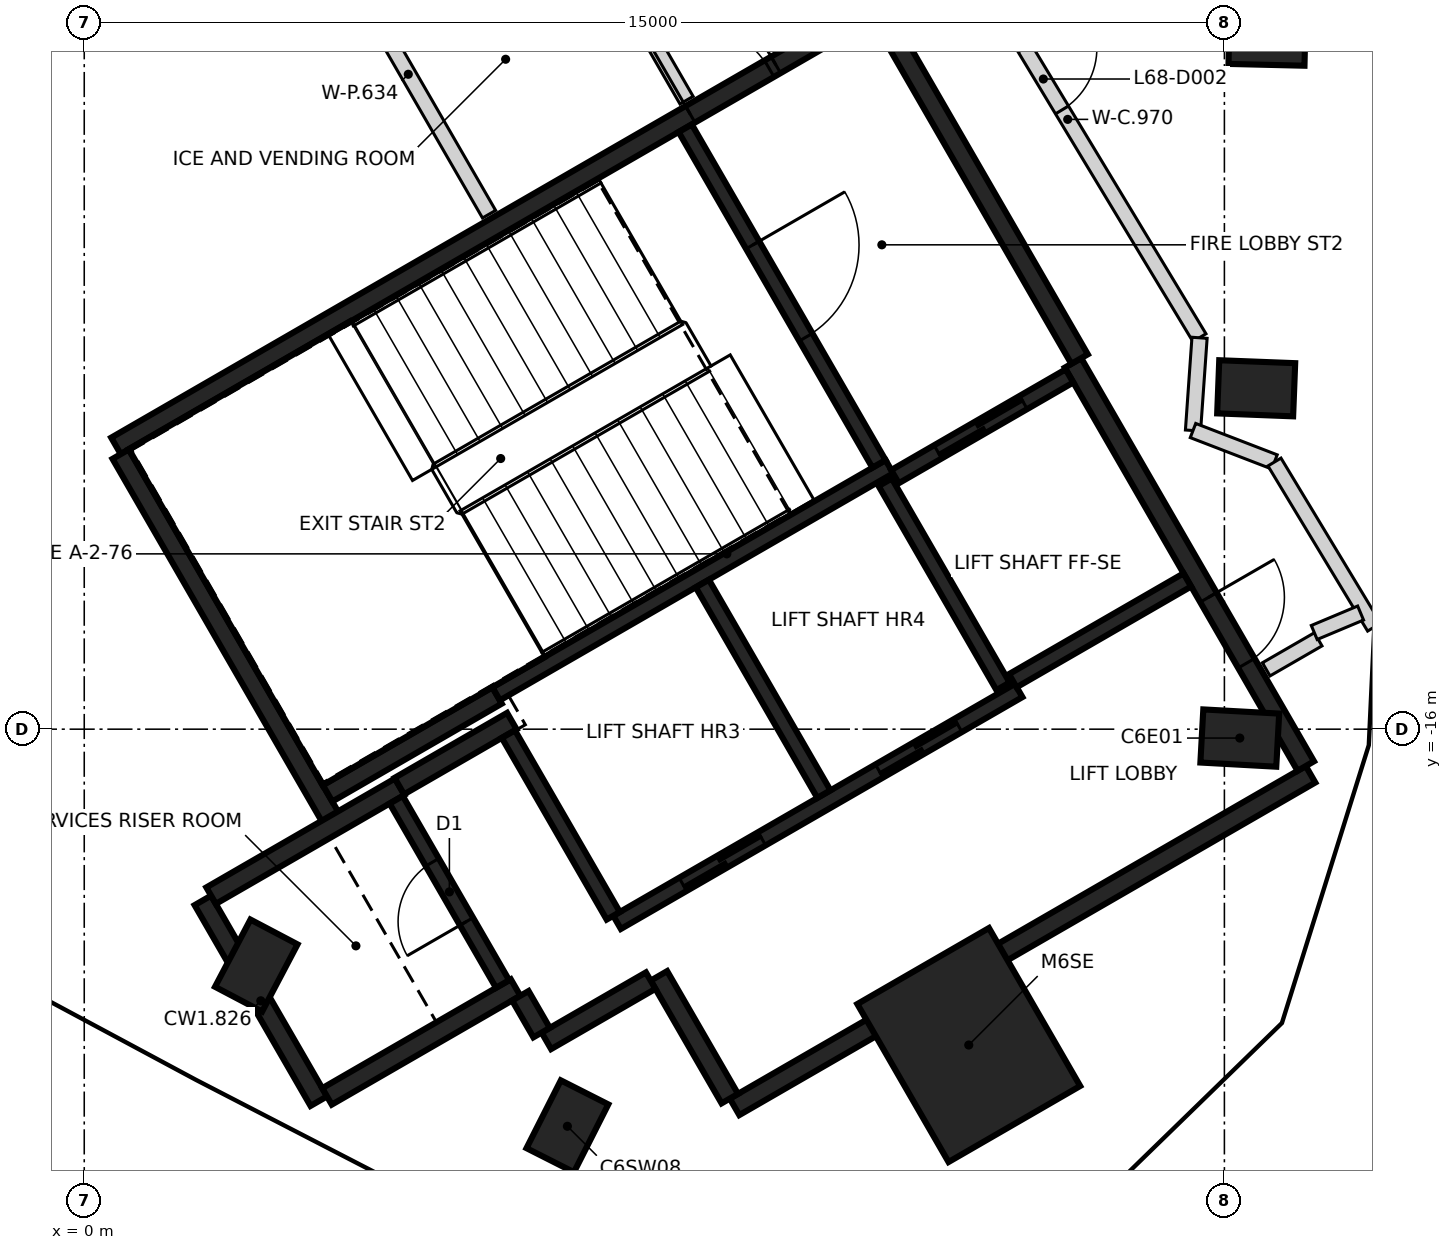
"""IFC4 building model, lengths in metres.
Left out: names, types, materials, properties, quantities, classifications, styles, units other than length and angle.
Written with IfcOpenShell. Run it as: python <this file> out.ifc"""

import sys

from ifc_helpers import new_model, si_unit, direction, frame, frame_2d, origin, origin_2d, place, context, subcontext, project, spatial, rectangle, extrude, element, fill, save


model = new_model("IFC4")
c1 = context("Model", 3, precision=1e-05, world=origin(), true_north=direction((0.0, 1.0)))
c2 = subcontext(c1, "Body", "Model", "MODEL_VIEW")
j1 = project(units=[si_unit("LENGTHUNIT", "METRE"), si_unit("PLANEANGLEUNIT", "RADIAN")], contexts=[c1])
p1 = place(None, origin())
s1 = spatial("IfcSite", under=j1, at=p1, CompositionType="ELEMENT")
p2 = place(p1, origin())
s2 = spatial("IfcBuilding", under=s1, at=p2, CompositionType="ELEMENT")
p3 = place(p2, frame((0.0, 0.0, 269.4)))
s3 = spatial("IfcBuildingStorey", under=s2, at=p3, CompositionType="ELEMENT", Elevation=269.4)
for number, where, z_axis, x_axis in (
    (1, (15.202, -16.117, -0.35), (0.0, 0.0, 1.0), (-0.998, 0.055, 0.0)),
    (2, (15.418, -11.515, -0.35), (0.0, 0.0, 1.0), (-0.999, 0.039, 0.0)),
    (3, (15.562, -6.91, -0.35), (0.0, 0.0, 1.0), (-1.0, 0.024, 0.0)),
    (4, (2.263, -19.11, -0.35), (0.0, 0.0, 1.0), (0.466, 0.885, 0.0)),
    (5, (6.356, -21.224, -0.35), (0.0, 0.0, 1.0), (0.452, 0.892, 0.0)),
):
    element("IfcColumn", number, at=place(p3, frame(where, z_axis=z_axis, x_axis=x_axis)), inside=s3, PredefinedType="COLUMN", context=c2, shape_type="SweptSolid", body=[
        extrude(rectangle(XDim=1.0, YDim=0.7, at=origin_2d()), origin(), (0.0, 0.0, 1.0), 3.6),
    ])
p4 = place(p3, frame((11.637, -20.155, -0.35), z_axis=(0.0, 0.0, 1.0), x_axis=(-0.5, 0.866025403784, 0.0)))
e6 = element("IfcColumn", 6, at=p4, inside=s3, PredefinedType="COLUMN", context=c2, shape_type="SweptSolid", body=[
    extrude(rectangle(XDim=2.4, YDim=2.0, at=origin_2d()), origin(), (0.0, 0.0, 1.0), 3.6),
])
p5 = place(p3, frame((0.417, -12.273, 0.0), z_axis=(0.0, 0.0, 1.0), x_axis=(0.866021906294, 0.500006057782, 0.0)))
e7 = element("IfcWall", 7, at=p5, inside=s3, PredefinedType="SHEAR", context=c2, shape_type="SweptSolid", body=[
    extrude(rectangle(XDim=11.55, YDim=0.25, at=frame_2d((5.775, 0.0))), origin(), (0.0, 0.0, 1.0), 3.25),
])
p6 = place(p5, frame((10.025, 0.0, 0.0)))
e8 = element("IfcOpeningElement", 8, at=p6, cuts=e7, PredefinedType="OPENING", context=c2, shape_type="SweptSolid", body=[
    extrude(rectangle(XDim=1.2, YDim=2.1, at=frame_2d((0.6, 1.05))), frame((0.0, 0.135, 0.0), z_axis=(0.0, -1.0, 0.0), x_axis=(1.0, 0.0, 0.0)), (0.0, 0.0, 1.0), 0.27),
])
p7 = place(p5, frame((8.725, 0.0, 0.0)))
e9 = element("IfcOpeningElement", 9, at=p7, cuts=e7, PredefinedType="OPENING", context=c2, shape_type="SweptSolid", body=[
    extrude(rectangle(XDim=1.2, YDim=2.1, at=frame_2d((0.6, 1.05))), frame((0.0, 0.135, 0.0), z_axis=(0.0, -1.0, 0.0), x_axis=(1.0, 0.0, 0.0)), (0.0, 0.0, 1.0), 0.27),
])
p8 = place(p3, frame((16.133, -16.594, 0.0), z_axis=(0.0, 0.0, 1.0), x_axis=(-0.866022959057, -0.500004234368, 0.0)))
e10 = element("IfcWall", 10, at=p8, inside=s3, PredefinedType="SHEAR", context=c2, shape_type="SweptSolid", body=[
    extrude(rectangle(XDim=8.75, YDim=0.25, at=frame_2d((4.375, 0.0))), origin(), (0.0, 0.0, 1.0), 3.25),
])
p9 = place(p3, frame((13.008, -11.181, 0.0), z_axis=(0.0, 0.0, 1.0), x_axis=(0.500001955336, -0.866024274868, 0.0)))
e11 = element("IfcWall", 11, at=p9, inside=s3, PredefinedType="SHEAR", context=c2, shape_type="SweptSolid", body=[
    extrude(rectangle(XDim=6.125, YDim=0.25, at=frame_2d((3.062, 0.0))), origin(), (0.0, 0.0, 1.0), 3.25),
])
p10 = place(p9, frame((3.563, 0.0, 0.0)))
e12 = element("IfcOpeningElement", 12, at=p10, cuts=e11, PredefinedType="OPENING", context=c2, shape_type="SweptSolid", body=[
    extrude(rectangle(XDim=1.0, YDim=2.1, at=frame_2d((0.5, 1.05))), frame((0.0, 0.135, 0.0), z_axis=(0.0, -1.0, 0.0), x_axis=(1.0, 0.0, 0.0)), (0.0, 0.0, 1.0), 0.27),
])
p11 = place(p3, frame((3.235, -17.153, 0.0), z_axis=(0.0, 0.0, 1.0), x_axis=(-0.500008851346, 0.866020293397, 0.0)))
e13 = element("IfcWall", 13, at=p11, inside=s3, PredefinedType="SHEAR", context=c2, shape_type="SweptSolid", body=[
    extrude(rectangle(XDim=5.51, YDim=0.25, at=frame_2d((2.755, 0.0))), origin(), (0.0, 0.0, 1.0), 3.25),
])
p12 = place(p3, frame((10.483, -6.606, 0.0), z_axis=(0.0, 0.0, 1.0), x_axis=(0.49999885962, -0.866026062182, 0.0)))
e14 = element("IfcWall", 14, at=p12, inside=s3, PredefinedType="SHEAR", context=c2, shape_type="SweptSolid", body=[
    extrude(rectangle(XDim=5.225, YDim=0.25, at=frame_2d((2.612, 0.0))), origin(), (0.0, 0.0, 1.0), 3.25),
])
p13 = place(p3, frame((3.085, -20.894, 0.0), z_axis=(0.0, 0.0, 1.0), x_axis=(-0.499978833458, 0.866037623948, 0.0)))
e15 = element("IfcWall", 15, at=p13, inside=s3, PredefinedType="SHEAR", context=c2, shape_type="SweptSolid", body=[
    extrude(rectangle(XDim=3.05, YDim=0.25, at=frame_2d((1.525, 0.0))), origin(), (0.0, 0.0, 1.0), 3.25),
])
p14 = place(p3, frame((1.669, -18.19, 0.0), z_axis=(0.0, 0.0, 1.0), x_axis=(0.866042235819, 0.499970844928, 0.0)))
e16 = element("IfcWall", 16, at=p14, inside=s3, PredefinedType="SHEAR", context=c2, shape_type="SweptSolid", body=[
    extrude(rectangle(XDim=2.865, YDim=0.25, at=frame_2d((1.432, 0.0))), origin(), (0.0, 0.0, 1.0), 3.25),
])
p15 = place(p3, frame((5.675, -19.399, 0.0), z_axis=(0.0, 0.0, 1.0), x_axis=(-0.866026637627, -0.499997862916, 0.0)))
e17 = element("IfcWall", 17, at=p15, inside=s3, PredefinedType="SHEAR", context=c2, shape_type="SweptSolid", body=[
    extrude(rectangle(XDim=2.865, YDim=0.25, at=frame_2d((1.432, 0.0))), origin(), (0.0, 0.0, 1.0), 3.25),
])
p16 = place(p3, frame((5.431, -15.556, 0.0), z_axis=(0.0, 0.0, 1.0), x_axis=(-0.866022940537, -0.500004266446, 0.0)))
e18 = element("IfcWall", 18, at=p16, inside=s3, PredefinedType="SHEAR", context=c2, shape_type="SweptSolid", body=[
    extrude(rectangle(XDim=2.575, YDim=0.25, at=frame_2d((1.287, 0.0))), origin(), (0.0, 0.0, 1.0), 3.25),
])
p17 = place(p3, frame((8.493, -20.86, 0.0), z_axis=(0.0, 0.0, 1.0), x_axis=(-0.500039802285, 0.866002422705, 0.0)))
e19 = element("IfcWall", 19, at=p17, inside=s3, PredefinedType="SHEAR", context=c2, shape_type="SweptSolid", body=[
    extrude(rectangle(XDim=1.865, YDim=0.25, at=frame_2d((0.932, 0.0))), origin(), (0.0, 0.0, 1.0), 3.25),
])
p18 = place(p3, frame((4.145, -16.749, 0.0), z_axis=(0.0, 0.0, 1.0), x_axis=(0.866038183914, 0.499977863513, 0.0)))
e20 = element("IfcWall", 20, at=p18, inside=s3, PredefinedType="SHEAR", context=c2, shape_type="SweptSolid", body=[
    extrude(rectangle(XDim=1.71, YDim=0.25, at=frame_2d((0.855, 0.0))), origin(), (0.0, 0.0, 1.0), 3.25),
])
p19 = place(p3, frame((7.452, -19.308, 0.0), z_axis=(0.0, 0.0, 1.0), x_axis=(-0.866044474677, -0.49996696679, 0.0)))
e21 = element("IfcWall", 21, at=p19, inside=s3, PredefinedType="SHEAR", context=c2, shape_type="SweptSolid", body=[
    extrude(rectangle(XDim=1.584, YDim=0.25, at=frame_2d((0.792, 0.0))), origin(), (0.0, 0.0, 1.0), 3.25),
])
p20 = place(p3, frame((6.017, -19.992, 0.0), z_axis=(0.0, 0.0, 1.0), x_axis=(-0.500364886717, 0.865814633822, 0.0)))
e22 = element("IfcWall", 22, at=p20, inside=s3, PredefinedType="SHEAR", context=c2, shape_type="SweptSolid", body=[
    extrude(rectangle(XDim=0.559, YDim=0.25, at=frame_2d((0.28, 0.0))), origin(), (0.0, 0.0, 1.0), 3.25),
])
p21 = place(p3, frame((5.419, -15.534, 0.0), z_axis=(0.0, 0.0, 1.0), x_axis=(0.866029065029, 0.499993658486, 0.0)))
e23 = element("IfcWall", 23, at=p21, inside=s3, PredefinedType="SHEAR", context=c2, shape_type="SweptSolid", body=[
    extrude(rectangle(XDim=5.974, YDim=0.2, at=frame_2d((2.987, 0.0))), origin(), (0.0, 0.0, 1.0), 3.25),
])
p22 = place(p3, frame((7.01, -18.542, 0.0), z_axis=(0.0, 0.0, 1.0), x_axis=(0.866030299012, 0.499991521122, 0.0)))
e24 = element("IfcWall", 24, at=p22, inside=s3, PredefinedType="SHEAR", context=c2, shape_type="SweptSolid", body=[
    extrude(rectangle(XDim=6.1, YDim=0.2, at=frame_2d((3.05, 0.0))), origin(), (0.0, 0.0, 1.0), 3.25),
])
p23 = place(p22, frame((1.0, 0.0, 0.0)))
e25 = element("IfcOpeningElement", 25, at=p23, cuts=e24, PredefinedType="OPENING", context=c2, shape_type="SweptSolid", body=[
    extrude(rectangle(XDim=1.2, YDim=2.1, at=frame_2d((0.6, 1.05))), frame((0.0, 0.11, 0.0), z_axis=(0.0, -1.0, 0.0), x_axis=(1.0, 0.0, 0.0)), (0.0, 0.0, 1.0), 0.22),
])
p24 = place(p22, frame((3.982, 0.0, 0.0)))
e26 = element("IfcOpeningElement", 26, at=p24, cuts=e24, PredefinedType="OPENING", context=c2, shape_type="SweptSolid", body=[
    extrude(rectangle(XDim=1.2, YDim=2.1, at=frame_2d((0.6, 1.05))), frame((0.0, 0.11, 0.0), z_axis=(0.0, -1.0, 0.0), x_axis=(1.0, 0.0, 0.0)), (0.0, 0.0, 1.0), 0.22),
])
p25 = place(p3, frame((7.906, -8.094, 0.0), z_axis=(0.0, 0.0, 1.0), x_axis=(0.500027839223, -0.866009330205, 0.0)))
e27 = element("IfcWall", 27, at=p25, inside=s3, PredefinedType="SHEAR", context=c2, shape_type="SweptSolid", body=[
    extrude(rectangle(XDim=5.098, YDim=0.2, at=frame_2d((2.549, 0.0))), origin(), (0.0, 0.0, 1.0), 3.25),
])
p26 = place(p25, frame((1.774, 0.0, 0.0)))
e28 = element("IfcOpeningElement", 28, at=p26, cuts=e27, PredefinedType="OPENING", context=c2, shape_type="SweptSolid", body=[
    extrude(rectangle(XDim=1.4, YDim=2.1, at=frame_2d((0.7, 1.05))), frame((0.0, 0.11, 0.0), z_axis=(0.0, -1.0, 0.0), x_axis=(1.0, 0.0, 0.0)), (0.0, 0.0, 1.0), 0.22),
])
p27 = place(p3, frame((8.132, -14.084, 0.0), z_axis=(0.0, 0.0, 1.0), x_axis=(0.499997778408, -0.866026686418, 0.0)))
e29 = element("IfcWall", 29, at=p27, inside=s3, PredefinedType="SHEAR", context=c2, shape_type="SweptSolid", body=[
    extrude(rectangle(XDim=3.198, YDim=0.2, at=frame_2d((1.599, 0.0))), origin(), (0.0, 0.0, 1.0), 3.25),
])
p28 = place(p3, frame((5.503, -19.352, 0.0), z_axis=(0.0, 0.0, 1.0), x_axis=(-0.499986818241, 0.866033014143, 0.0)))
e30 = element("IfcWall", 30, at=p28, inside=s3, PredefinedType="SHEAR", context=c2, shape_type="SweptSolid", body=[
    extrude(rectangle(XDim=2.798, YDim=0.2, at=frame_2d((1.399, 0.0))), origin(), (0.0, 0.0, 1.0), 3.25),
])
p29 = place(p28, frame((0.949, 0.0, 0.0)))
e31 = element("IfcOpeningElement", 31, at=p29, cuts=e30, PredefinedType="OPENING", context=c2, shape_type="SweptSolid", body=[
    extrude(rectangle(XDim=0.9, YDim=2.1, at=frame_2d((0.45, 1.05))), frame((0.0, 0.11, 0.0), z_axis=(0.0, -1.0, 0.0), x_axis=(1.0, 0.0, 0.0)), (0.0, 0.0, 1.0), 0.22),
])
p30 = place(p3, frame((6.96, -18.455, 0.0), z_axis=(0.0, 0.0, 1.0), x_axis=(-0.499926705758, 0.866067716099, 0.0)))
e32 = element("IfcWall", 32, at=p30, inside=s3, PredefinedType="SHEAR", context=c2, shape_type="SweptSolid", body=[
    extrude(rectangle(XDim=2.759, YDim=0.2, at=frame_2d((1.38, 0.0))), origin(), (0.0, 0.0, 1.0), 3.25),
])
p31 = place(p3, frame((12.088, -15.437, 0.0), z_axis=(0.0, 0.0, 1.0), x_axis=(-0.500026960575, 0.86600983753, 0.0)))
e33 = element("IfcWall", 33, at=p31, inside=s3, PredefinedType="SHEAR", context=c2, shape_type="SweptSolid", body=[
    extrude(rectangle(XDim=3.1, YDim=0.2, at=frame_2d((1.55, 0.0))), origin(), (0.0, 0.0, 1.0), 3.25),
])
p32 = place(p3, frame((10.666, -12.678, 0.0), z_axis=(0.0, 0.0, 1.0), x_axis=(0.866018407898, 0.500012117035, 0.0)))
e34 = element("IfcWall", 34, at=p32, inside=s3, PredefinedType="SHEAR", context=c2, shape_type="SweptSolid", body=[
    extrude(rectangle(XDim=2.651, YDim=0.2, at=frame_2d((1.325, 0.0))), origin(), (0.0, 0.0, 1.0), 3.25),
])
p33 = place(p32, frame((0.652, 0.0, 0.0)))
e35 = element("IfcOpeningElement", 35, at=p33, cuts=e34, PredefinedType="OPENING", context=c2, shape_type="SweptSolid", body=[
    extrude(rectangle(XDim=1.3, YDim=2.1, at=frame_2d((0.65, 1.05))), frame((0.0, 0.11, 0.0), z_axis=(0.0, -1.0, 0.0), x_axis=(1.0, 0.0, 0.0)), (0.0, 0.0, 1.0), 0.22),
])
p34 = place(p3, frame((14.512, -14.037, 0.0), z_axis=(0.0, 0.0, 1.0), x_axis=(-0.866018407898, -0.500012117035, 0.0)))
e36 = element("IfcWall", 36, at=p34, inside=s3, PredefinedType="SHEAR", context=c2, shape_type="SweptSolid", body=[
    extrude(rectangle(XDim=2.651, YDim=0.2, at=frame_2d((1.325, 0.0))), origin(), (0.0, 0.0, 1.0), 3.25),
])
p35 = place(p3, frame((7.427, -6.864, 0.0), z_axis=(0.0, 0.0, 1.0), x_axis=(0.499942098031, -0.866058830921, 0.0)))
e37 = element("IfcWall", 37, at=p35, inside=s3, PredefinedType="PARTITIONING", context=c2, shape_type="SweptSolid", body=[
    extrude(rectangle(XDim=0.994, YDim=0.2, at=frame_2d((0.497, 0.0))), origin(), (0.0, 0.0, 1.0), 3.25),
])
p36 = place(p3, frame((11.205, -5.105, 0.0), z_axis=(0.0, 0.0, 1.0), x_axis=(0.516682442017, -0.856177116087, 0.0)))
e38 = element("IfcWall", 38, at=p36, inside=s3, PredefinedType="PARTITIONING", context=c2, shape_type="SweptSolid", body=[
    extrude(rectangle(XDim=6.71, YDim=0.2, at=frame_2d((3.355, 0.0))), origin(), (0.0, 0.0, 1.0), 3.25),
])
p37 = place(p36, frame((2.26, 0.0, 0.0)))
e39 = element("IfcOpeningElement", 39, at=p37, cuts=e38, PredefinedType="OPENING", context=c2, shape_type="SweptSolid", body=[
    extrude(rectangle(XDim=0.95, YDim=2.1, at=frame_2d((0.475, 1.05))), frame((0.0, 0.11, 0.0), z_axis=(0.0, -1.0, 0.0), x_axis=(1.0, 0.0, 0.0)), (0.0, 0.0, 1.0), 0.22),
])
p38 = place(p3, frame((14.587, -12.071, 0.0), z_axis=(0.0, 0.0, 1.0), x_axis=(0.070466777423, 0.997514126857, 0.0)))
e40 = element("IfcWall", 40, at=p38, inside=s3, PredefinedType="PARTITIONING", context=c2, shape_type="SweptSolid", body=[
    extrude(rectangle(XDim=1.223, YDim=0.2, at=frame_2d((0.611, 0.0))), origin(), (0.0, 0.0, 1.0), 3.25),
])
p39 = place(p3, frame((14.587, -12.071, 0.0), z_axis=(0.0, 0.0, 1.0), x_axis=(0.933192153307, -0.359377802606, 0.0)))
e41 = element("IfcWall", 41, at=p39, inside=s3, PredefinedType="PARTITIONING", context=c2, shape_type="SweptSolid", body=[
    extrude(rectangle(XDim=1.149, YDim=0.2, at=frame_2d((0.574, 0.0))), origin(), (0.0, 0.0, 1.0), 2.35),
])
p40 = place(p3, frame((15.55, -15.213, 0.0), z_axis=(0.0, 0.0, 1.0), x_axis=(0.865989998118, 0.500061319399, 0.0)))
e42 = element("IfcWall", 42, at=p40, inside=s3, PredefinedType="PARTITIONING", context=c2, shape_type="SweptSolid", body=[
    extrude(rectangle(XDim=0.79, YDim=0.2, at=frame_2d((0.395, 0.0))), origin(), (0.0, 0.0, 1.0), 3.25),
])
p41 = place(p3, frame((15.659, -12.485, 0.0), z_axis=(0.0, 0.0, 1.0), x_axis=(0.516729412104, -0.856148769003, 0.0)))
e43 = element("IfcWall", 43, at=p41, inside=s3, PredefinedType="PARTITIONING", context=c2, shape_type="SweptSolid", body=[
    extrude(rectangle(XDim=2.538, YDim=0.2, at=frame_2d((1.269, 0.0))), origin(), (0.0, 0.0, 1.0), 3.25),
])
p42 = place(p3, frame((16.182, -14.728, 0.0), z_axis=(0.0, 0.0, 1.0), x_axis=(0.922058491377, 0.387050563207, 0.0)))
e44 = element("IfcWall", 44, at=p42, inside=s3, PredefinedType="PARTITIONING", context=c2, shape_type="SweptSolid", body=[
    extrude(rectangle(XDim=0.662, YDim=0.2, at=frame_2d((0.331, 0.0))), origin(), (0.0, 0.0, 1.0), 3.25),
])
p43 = place(p3, frame((3.2, -5.543, 0.0), z_axis=(0.0, 0.0, 1.0), x_axis=(0.500060428066, -0.865990512813, 0.0)))
e45 = element("IfcWall", 45, at=p43, inside=s3, PredefinedType="PARTITIONING", context=c2, shape_type="SweptSolid", body=[
    extrude(rectangle(XDim=4.252, YDim=0.2, at=frame_2d((2.126, 0.0))), origin(), (0.0, 0.0, 1.0), 3.25),
])
p44 = place(p33, origin())
e46 = element("IfcDoor", 46, at=p44, inside=s3, OperationType="SLIDING_TO_RIGHT", PredefinedType="DOOR", context=c2, shape_type="SweptSolid", body=[
    extrude(rectangle(XDim=1.3, YDim=2.1, at=frame_2d((0.65, 1.05))), frame((0.0, 0.025, 0.0), z_axis=(0.0, -1.0, 0.0), x_axis=(1.0, 0.0, 0.0)), (0.0, 0.0, 1.0), 0.05),
])
fill(e35, e46)
p45 = place(p23, origin())
e47 = element("IfcDoor", 47, at=p45, inside=s3, OperationType="DOUBLE_DOOR_SLIDING", PredefinedType="DOOR", context=c2, shape_type="SweptSolid", body=[
    extrude(rectangle(XDim=1.2, YDim=2.1, at=frame_2d((0.6, 1.05))), frame((0.0, 0.025, 0.0), z_axis=(0.0, -1.0, 0.0), x_axis=(1.0, 0.0, 0.0)), (0.0, 0.0, 1.0), 0.05),
])
fill(e25, e47)
p46 = place(p24, origin())
e48 = element("IfcDoor", 48, at=p46, inside=s3, OperationType="DOUBLE_DOOR_SLIDING", PredefinedType="DOOR", context=c2, shape_type="SweptSolid", body=[
    extrude(rectangle(XDim=1.2, YDim=2.1, at=frame_2d((0.6, 1.05))), frame((0.0, 0.025, 0.0), z_axis=(0.0, -1.0, 0.0), x_axis=(1.0, 0.0, 0.0)), (0.0, 0.0, 1.0), 0.05),
])
fill(e26, e48)
p47 = place(p10, origin())
e49 = element("IfcDoor", 49, at=p47, inside=s3, OperationType="SINGLE_SWING_LEFT", PredefinedType="DOOR", context=c2, shape_type="SweptSolid", body=[
    extrude(rectangle(XDim=1.0, YDim=2.1, at=frame_2d((0.5, 1.05))), frame((0.0, 0.025, 0.0), z_axis=(0.0, -1.0, 0.0), x_axis=(1.0, 0.0, 0.0)), (0.0, 0.0, 1.0), 0.05),
])
fill(e12, e49)
p48 = place(p6, origin())
e50 = element("IfcDoor", 50, at=p48, inside=s3, OperationType="SINGLE_SWING_LEFT", PredefinedType="DOOR", context=c2, shape_type="SweptSolid", body=[
    extrude(rectangle(XDim=1.2, YDim=2.1, at=frame_2d((0.6, 1.05))), frame((0.0, 0.025, 0.0), z_axis=(0.0, -1.0, 0.0), x_axis=(1.0, 0.0, 0.0)), (0.0, 0.0, 1.0), 0.05),
])
fill(e8, e50)
p49 = place(p7, origin())
e51 = element("IfcDoor", 51, at=p49, inside=s3, OperationType="SINGLE_SWING_RIGHT", PredefinedType="DOOR", context=c2, shape_type="SweptSolid", body=[
    extrude(rectangle(XDim=1.2, YDim=2.1, at=frame_2d((0.6, 1.05))), frame((0.0, 0.025, 0.0), z_axis=(0.0, -1.0, 0.0), x_axis=(1.0, 0.0, 0.0)), (0.0, 0.0, 1.0), 0.05),
])
fill(e9, e51)
p50 = place(p26, origin())
e52 = element("IfcDoor", 52, at=p50, inside=s3, OperationType="SINGLE_SWING_RIGHT", PredefinedType="DOOR", context=c2, shape_type="SweptSolid", body=[
    extrude(rectangle(XDim=1.4, YDim=2.1, at=frame_2d((0.7, 1.05))), frame((0.0, 0.025, 0.0), z_axis=(0.0, -1.0, 0.0), x_axis=(1.0, 0.0, 0.0)), (0.0, 0.0, 1.0), 0.05),
])
fill(e28, e52)
p51 = place(p29, origin())
e53 = element("IfcDoor", 53, at=p51, inside=s3, OperationType="SINGLE_SWING_LEFT", PredefinedType="DOOR", context=c2, shape_type="SweptSolid", body=[
    extrude(rectangle(XDim=0.9, YDim=2.1, at=frame_2d((0.45, 1.05))), frame((0.0, 0.025, 0.0), z_axis=(0.0, -1.0, 0.0), x_axis=(1.0, 0.0, 0.0)), (0.0, 0.0, 1.0), 0.05),
])
fill(e31, e53)
p52 = place(p37, origin())
e54 = element("IfcDoor", 54, at=p52, inside=s3, OperationType="SINGLE_SWING_LEFT", PredefinedType="DOOR", context=c2, shape_type="SweptSolid", body=[
    extrude(rectangle(XDim=0.95, YDim=2.1, at=frame_2d((0.475, 1.05))), frame((0.0, 0.025, 0.0), z_axis=(0.0, -1.0, 0.0), x_axis=(1.0, 0.0, 0.0)), (0.0, 0.0, 1.0), 0.05),
])
fill(e39, e54)
save(model, sys.argv[1])
